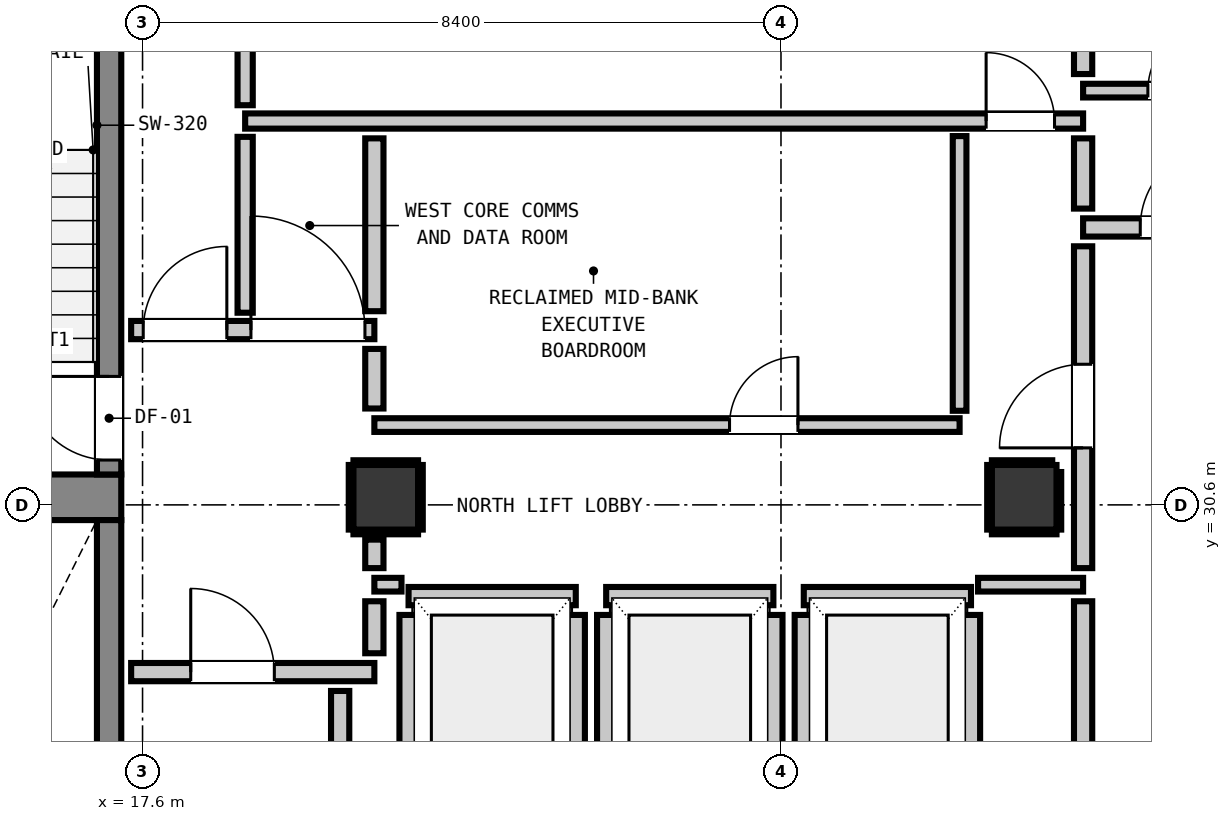
"""IFC4 building model, lengths in metres.
Left out: names, types, materials, properties, quantities, classifications, styles, units other than length and angle.
Written with IfcOpenShell. Run it as: python <this file> out.ifc"""

import sys

from ifc_helpers import new_model, si_unit, direction, frame, frame_2d, origin, origin_2d, place, context, subcontext, project, spatial, rectangle, extrude, element, fill, save


model = new_model("IFC4")
c1 = context("Model", 3, precision=1e-05, world=origin(), true_north=direction((0.0, 1.0)))
c2 = subcontext(c1, "Body", "Model", "MODEL_VIEW")
j1 = project(units=[si_unit("LENGTHUNIT", "METRE"), si_unit("PLANEANGLEUNIT", "RADIAN")], contexts=[c1])
p1 = place(None, origin())
s1 = spatial("IfcSite", under=j1, at=p1, CompositionType="ELEMENT")
p2 = place(p1, origin())
s2 = spatial("IfcBuilding", under=s1, at=p2, CompositionType="ELEMENT")
p3 = place(p2, frame((0.0, 0.0, 203.44)))
s3 = spatial("IfcBuildingStorey", under=s2, at=p3, CompositionType="ELEMENT", Elevation=203.44)
p4 = place(p3, frame((13.78, 30.7, 0.0), z_axis=(0.0, 0.0, 1.0), x_axis=(1.0, 0.0, 0.0)))
e1 = element("IfcWall", 1, at=p4, inside=s3, PredefinedType="SHEAR", context=c2, shape_type="SweptSolid", body=[
    extrude(rectangle(XDim=3.54, YDim=0.6, at=frame_2d((1.77, 0.0))), origin(), (0.0, 0.0, 1.0), 3.32),
])
p5 = place(p3, frame((17.16, 31.0, 0.0), z_axis=(0.0, 0.0, 1.0), x_axis=(0.0, 1.0, 0.0)))
e2 = element("IfcWall", 2, at=p5, inside=s3, PredefinedType="SHEAR", context=c2, shape_type="SweptSolid", body=[
    extrude(rectangle(XDim=7.8, YDim=0.32, at=frame_2d((3.9, 0.0))), origin(), (0.0, 0.0, 1.0), 3.32),
])
p6 = place(p5, frame((0.19, 0.0, 0.0)))
e3 = element("IfcOpeningElement", 3, at=p6, cuts=e2, PredefinedType="OPENING", context=c2, shape_type="SweptSolid", body=[
    extrude(rectangle(XDim=1.1, YDim=2.15, at=frame_2d((0.55, 1.075))), frame((0.0, 0.17, 0.0), z_axis=(0.0, -1.0, 0.0), x_axis=(1.0, 0.0, 0.0)), (0.0, 0.0, 1.0), 0.34),
])
p7 = place(p3, frame((17.16, 22.4, 0.0), z_axis=(0.0, 0.0, 1.0), x_axis=(0.0, 1.0, 0.0)))
e4 = element("IfcWall", 4, at=p7, inside=s3, PredefinedType="SHEAR", context=c2, shape_type="SweptSolid", body=[
    extrude(rectangle(XDim=8.0, YDim=0.32, at=frame_2d((4.0, 0.0))), origin(), (0.0, 0.0, 1.0), 3.32),
])
p8 = place(p7, frame((0.39, 0.0, 0.0)))
e5 = element("IfcOpeningElement", 5, at=p8, cuts=e4, PredefinedType="OPENING", context=c2, shape_type="SweptSolid", body=[
    extrude(rectangle(XDim=1.1, YDim=2.15, at=frame_2d((0.55, 1.075))), frame((0.0, 0.17, 0.0), z_axis=(0.0, -1.0, 0.0), x_axis=(1.0, 0.0, 0.0)), (0.0, 0.0, 1.0), 0.34),
])
for number, where, z_axis, x_axis in (
    (6, (20.8, 30.7, 0.0), (0.0, 0.0, 1.0), (1.0, 0.0, 0.0)),
    (7, (29.2, 30.7, 0.0), (0.0, 0.0, 1.0), (1.0, 0.0, 0.0)),
):
    element("IfcColumn", number, at=place(p3, frame(where, z_axis=z_axis, x_axis=x_axis)), inside=s3, PredefinedType="COLUMN", context=c2, shape_type="SweptSolid", body=[
        extrude(rectangle(XDim=0.85, YDim=0.85, at=origin_2d()), origin(), (0.0, 0.0, 1.0), 3.32),
    ])
p9 = place(p3, frame((21.1, 29.4, 0.0), z_axis=(0.0, 0.0, 1.0), x_axis=(1.0, 0.0, 0.0)))
e8 = element("IfcWall", 8, at=p9, inside=s3, PredefinedType="PARTITIONING", context=c2, shape_type="SweptSolid", body=[
    extrude(rectangle(XDim=2.2, YDim=0.24, at=frame_2d((1.1, 0.0))), origin(), (0.0, 0.0, 1.0), 3.1),
])
p10 = place(p3, frame((21.1, 27.048, 0.0), z_axis=(0.0, 0.0, 1.0), x_axis=(0.0, 1.0, 0.0)))
e9 = element("IfcWall", 9, at=p10, inside=s3, PredefinedType="PARTITIONING", context=c2, shape_type="SweptSolid", body=[
    extrude(rectangle(XDim=2.104, YDim=0.24, at=frame_2d((1.052, 0.0))), origin(), (0.0, 0.0, 1.0), 2.335),
])
p11 = place(p3, frame((23.3, 27.048, 0.0), z_axis=(0.0, 0.0, 1.0), x_axis=(0.0, 1.0, 0.0)))
e10 = element("IfcWall", 10, at=p11, inside=s3, PredefinedType="PARTITIONING", context=c2, shape_type="SweptSolid", body=[
    extrude(rectangle(XDim=2.104, YDim=0.24, at=frame_2d((1.052, 0.0))), origin(), (0.0, 0.0, 1.0), 3.1),
])
p12 = place(p3, frame((23.7, 29.4, 0.0), z_axis=(0.0, 0.0, 1.0), x_axis=(1.0, 0.0, 0.0)))
e11 = element("IfcWall", 11, at=p12, inside=s3, PredefinedType="PARTITIONING", context=c2, shape_type="SweptSolid", body=[
    extrude(rectangle(XDim=2.2, YDim=0.24, at=frame_2d((1.1, 0.0))), origin(), (0.0, 0.0, 1.0), 3.1),
])
for number, where, z_axis, x_axis in (
    (12, (23.7, 27.048, 0.0), (0.0, 0.0, 1.0), (0.0, 1.0, 0.0)),
    (13, (25.9, 27.048, 0.0), (0.0, 0.0, 1.0), (0.0, 1.0, 0.0)),
):
    element("IfcWall", number, at=place(p3, frame(where, z_axis=z_axis, x_axis=x_axis)), inside=s3, PredefinedType="PARTITIONING", context=c2, shape_type="SweptSolid", body=[
        extrude(rectangle(XDim=2.104, YDim=0.24, at=frame_2d((1.052, 0.0))), origin(), (0.0, 0.0, 1.0), 3.1),
    ])
p13 = place(p3, frame((26.3, 29.4, 0.0), z_axis=(0.0, 0.0, 1.0), x_axis=(1.0, 0.0, 0.0)))
e14 = element("IfcWall", 14, at=p13, inside=s3, PredefinedType="PARTITIONING", context=c2, shape_type="SweptSolid", body=[
    extrude(rectangle(XDim=2.2, YDim=0.24, at=frame_2d((1.1, 0.0))), origin(), (0.0, 0.0, 1.0), 3.1),
])
p14 = place(p3, frame((26.3, 27.048, 0.0), z_axis=(0.0, 0.0, 1.0), x_axis=(0.0, 1.0, 0.0)))
e15 = element("IfcWall", 15, at=p14, inside=s3, PredefinedType="PARTITIONING", context=c2, shape_type="SweptSolid", body=[
    extrude(rectangle(XDim=2.104, YDim=0.24, at=frame_2d((1.052, 0.0))), origin(), (0.0, 0.0, 1.0), 3.1),
])
p15 = place(p3, frame((28.5, 27.33, 0.0), z_axis=(0.0, 0.0, 1.0), x_axis=(0.0, 1.0, 0.0)))
e16 = element("IfcWall", 16, at=p15, inside=s3, PredefinedType="PARTITIONING", context=c2, shape_type="SweptSolid", body=[
    extrude(rectangle(XDim=1.822, YDim=0.24, at=frame_2d((0.911, 0.0))), origin(), (0.0, 0.0, 1.0), 3.1),
])
p16 = place(p3, frame((17.45, 28.4, 0.0), z_axis=(0.0, 0.0, 1.0), x_axis=(1.0, 0.0, 0.0)))
e17 = element("IfcWall", 17, at=p16, inside=s3, PredefinedType="PARTITIONING", context=c2, shape_type="SweptSolid", body=[
    extrude(rectangle(XDim=3.2, YDim=0.24, at=frame_2d((1.6, 0.0))), origin(), (0.0, 0.0, 1.0), 3.1),
])
p17 = place(p16, frame((0.784, 0.0, 0.0)))
e18 = element("IfcOpeningElement", 18, at=p17, cuts=e17, PredefinedType="OPENING", context=c2, shape_type="SweptSolid", body=[
    extrude(rectangle(XDim=1.1, YDim=2.15, at=frame_2d((0.55, 1.075))), frame((0.0, 0.13, 0.0), z_axis=(0.0, -1.0, 0.0), x_axis=(1.0, 0.0, 0.0)), (0.0, 0.0, 1.0), 0.26),
])
p18 = place(p3, frame((17.45, 32.9, 0.0), z_axis=(0.0, 0.0, 1.0), x_axis=(1.0, 0.0, 0.0)))
e19 = element("IfcWall", 19, at=p18, inside=s3, PredefinedType="PARTITIONING", context=c2, shape_type="SweptSolid", body=[
    extrude(rectangle(XDim=3.2, YDim=0.24, at=frame_2d((1.6, 0.0))), origin(), (0.0, 0.0, 1.0), 3.1),
])
p19 = place(p18, frame((0.159, 0.0, 0.0)))
e20 = element("IfcOpeningElement", 20, at=p19, cuts=e19, PredefinedType="OPENING", context=c2, shape_type="SweptSolid", body=[
    extrude(rectangle(XDim=1.1, YDim=2.15, at=frame_2d((0.55, 1.075))), frame((0.0, 0.13, 0.0), z_axis=(0.0, -1.0, 0.0), x_axis=(1.0, 0.0, 0.0)), (0.0, 0.0, 1.0), 0.26),
])
p20 = place(p18, frame((1.576, 0.0, 0.0)))
e21 = element("IfcOpeningElement", 21, at=p20, cuts=e19, PredefinedType="OPENING", context=c2, shape_type="SweptSolid", body=[
    extrude(rectangle(XDim=1.5, YDim=2.15, at=frame_2d((0.75, 1.075))), frame((0.0, 0.13, 0.0), z_axis=(0.0, -1.0, 0.0), x_axis=(1.0, 0.0, 0.0)), (0.0, 0.0, 1.0), 0.26),
])
p21 = place(p3, frame((29.975, 34.25, 0.0), z_axis=(0.0, 0.0, 1.0), x_axis=(1.0, 0.0, 0.0)))
e22 = element("IfcWall", 22, at=p21, inside=s3, PredefinedType="PARTITIONING", context=c2, shape_type="SweptSolid", body=[
    extrude(rectangle(XDim=2.475, YDim=0.24, at=frame_2d((1.237, 0.0))), origin(), (0.0, 0.0, 1.0), 3.1),
])
p22 = place(p21, frame((0.752, 0.0, 0.0)))
e23 = element("IfcOpeningElement", 23, at=p22, cuts=e22, PredefinedType="OPENING", context=c2, shape_type="SweptSolid", body=[
    extrude(rectangle(XDim=1.1, YDim=2.15, at=frame_2d((0.55, 1.075))), frame((0.0, 0.13, 0.0), z_axis=(0.0, -1.0, 0.0), x_axis=(1.0, 0.0, 0.0)), (0.0, 0.0, 1.0), 0.26),
])
p23 = place(p3, frame((18.95, 35.65, 0.0), z_axis=(0.0, 0.0, 1.0), x_axis=(1.0, 0.0, 0.0)))
e24 = element("IfcWall", 24, at=p23, inside=s3, PredefinedType="PARTITIONING", context=c2, shape_type="SweptSolid", body=[
    extrude(rectangle(XDim=11.025, YDim=0.2, at=frame_2d((5.513, 0.0))), origin(), (0.0, 0.0, 1.0), 3.1),
])
p24 = place(p23, frame((9.749, 0.0, 0.0)))
e25 = element("IfcOpeningElement", 25, at=p24, cuts=e24, PredefinedType="OPENING", context=c2, shape_type="SweptSolid", body=[
    extrude(rectangle(XDim=0.9, YDim=2.1, at=frame_2d((0.45, 1.05))), frame((0.0, 0.11, 0.0), z_axis=(0.0, -1.0, 0.0), x_axis=(1.0, 0.0, 0.0)), (0.0, 0.0, 1.0), 0.22),
])
p25 = place(p3, frame((20.65, 29.55, 0.0), z_axis=(0.0, 0.0, 1.0), x_axis=(1.0, 0.0, 0.0)))
e26 = element("IfcWall", 26, at=p25, inside=s3, PredefinedType="PARTITIONING", context=c2, shape_type="SweptSolid", body=[
    extrude(rectangle(XDim=0.357, YDim=0.18, at=frame_2d((0.179, 0.0))), origin(), (0.0, 0.0, 1.0), 3.1),
])
p26 = place(p3, frame((28.593, 29.55, 0.0), z_axis=(0.0, 0.0, 1.0), x_axis=(1.0, 0.0, 0.0)))
e27 = element("IfcWall", 27, at=p26, inside=s3, PredefinedType="PARTITIONING", context=c2, shape_type="SweptSolid", body=[
    extrude(rectangle(XDim=1.382, YDim=0.18, at=frame_2d((0.691, 0.0))), origin(), (0.0, 0.0, 1.0), 3.1),
])
p27 = place(p3, frame((20.65, 31.65, 0.0), z_axis=(0.0, 0.0, 1.0), x_axis=(1.0, 0.0, 0.0)))
e28 = element("IfcWall", 28, at=p27, inside=s3, PredefinedType="PARTITIONING", context=c2, shape_type="SweptSolid", body=[
    extrude(rectangle(XDim=7.7, YDim=0.18, at=frame_2d((3.85, 0.0))), origin(), (0.0, 0.0, 1.0), 3.1),
])
p28 = place(p27, frame((4.673, 0.0, 0.0)))
e29 = element("IfcOpeningElement", 29, at=p28, cuts=e28, PredefinedType="OPENING", context=c2, shape_type="SweptSolid", body=[
    extrude(rectangle(XDim=0.9, YDim=2.1, at=frame_2d((0.45, 1.05))), frame((0.0, 0.1, 0.0), z_axis=(0.0, -1.0, 0.0), x_axis=(1.0, 0.0, 0.0)), (0.0, 0.0, 1.0), 0.2),
])
p29 = place(p3, frame((29.975, 36.05, 0.0), z_axis=(0.0, 0.0, 1.0), x_axis=(1.0, 0.0, 0.0)))
e30 = element("IfcWall", 30, at=p29, inside=s3, PredefinedType="PARTITIONING", context=c2, shape_type="SweptSolid", body=[
    extrude(rectangle(XDim=2.505, YDim=0.18, at=frame_2d((1.252, 0.0))), origin(), (0.0, 0.0, 1.0), 3.1),
])
p30 = place(p29, frame((0.852, 0.0, 0.0)))
e31 = element("IfcOpeningElement", 31, at=p30, cuts=e30, PredefinedType="OPENING", context=c2, shape_type="SweptSolid", body=[
    extrude(rectangle(XDim=0.9, YDim=2.1, at=frame_2d((0.45, 1.05))), frame((0.0, 0.1, 0.0), z_axis=(0.0, -1.0, 0.0), x_axis=(1.0, 0.0, 0.0)), (0.0, 0.0, 1.0), 0.2),
])
p31 = place(p3, frame((20.2, 21.398, 0.0), z_axis=(0.0, 0.0, 1.0), x_axis=(0.0, 1.0, 0.0)))
e32 = element("IfcWall", 32, at=p31, inside=s3, PredefinedType="PARTITIONING", context=c2, shape_type="SweptSolid", body=[
    extrude(rectangle(XDim=6.754, YDim=0.24, at=frame_2d((3.377, 0.0))), origin(), (0.0, 0.0, 1.0), 3.1),
])
p32 = place(p3, frame((20.65, 28.648, 0.0), z_axis=(0.0, 0.0, 1.0), x_axis=(0.0, 1.0, 0.0)))
e33 = element("IfcWall", 33, at=p32, inside=s3, PredefinedType="PARTITIONING", context=c2, shape_type="SweptSolid", body=[
    extrude(rectangle(XDim=0.684, YDim=0.24, at=frame_2d((0.342, 0.0))), origin(), (0.0, 0.0, 1.0), 2.335),
])
p33 = place(p3, frame((20.65, 29.768, 0.0), z_axis=(0.0, 0.0, 1.0), x_axis=(0.0, 1.0, 0.0)))
e34 = element("IfcWall", 34, at=p33, inside=s3, PredefinedType="PARTITIONING", context=c2, shape_type="SweptSolid", body=[
    extrude(rectangle(XDim=0.375, YDim=0.24, at=frame_2d((0.188, 0.0))), origin(), (0.0, 0.0, 1.0), 2.335),
])
p34 = place(p3, frame((20.65, 31.868, 0.0), z_axis=(0.0, 0.0, 1.0), x_axis=(0.0, 1.0, 0.0)))
e35 = element("IfcWall", 35, at=p34, inside=s3, PredefinedType="PARTITIONING", context=c2, shape_type="SweptSolid", body=[
    extrude(rectangle(XDim=0.784, YDim=0.24, at=frame_2d((0.392, 0.0))), origin(), (0.0, 0.0, 1.0), 2.335),
])
p35 = place(p3, frame((20.65, 33.148, 0.0), z_axis=(0.0, 0.0, 1.0), x_axis=(0.0, 1.0, 0.0)))
e36 = element("IfcWall", 36, at=p35, inside=s3, PredefinedType="PARTITIONING", context=c2, shape_type="SweptSolid", body=[
    extrude(rectangle(XDim=2.274, YDim=0.24, at=frame_2d((1.137, 0.0))), origin(), (0.0, 0.0, 1.0), 2.335),
])
p36 = place(p3, frame((29.975, 25.648, 0.0), z_axis=(0.0, 0.0, 1.0), x_axis=(0.0, 1.0, 0.0)))
e37 = element("IfcWall", 37, at=p36, inside=s3, PredefinedType="PARTITIONING", context=c2, shape_type="SweptSolid", body=[
    extrude(rectangle(XDim=3.684, YDim=0.24, at=frame_2d((1.842, 0.0))), origin(), (0.0, 0.0, 1.0), 3.1),
])
p37 = place(p3, frame((29.975, 29.768, 0.0), z_axis=(0.0, 0.0, 1.0), x_axis=(0.0, 1.0, 0.0)))
e38 = element("IfcWall", 38, at=p37, inside=s3, PredefinedType="PARTITIONING", context=c2, shape_type="SweptSolid", body=[
    extrude(rectangle(XDim=4.234, YDim=0.24, at=frame_2d((2.117, 0.0))), origin(), (0.0, 0.0, 1.0), 3.1),
])
p38 = place(p37, frame((1.582, 0.0, 0.0)))
e39 = element("IfcOpeningElement", 39, at=p38, cuts=e38, PredefinedType="OPENING", context=c2, shape_type="SweptSolid", body=[
    extrude(rectangle(XDim=1.1, YDim=2.15, at=frame_2d((0.55, 1.075))), frame((0.0, 0.13, 0.0), z_axis=(0.0, -1.0, 0.0), x_axis=(1.0, 0.0, 0.0)), (0.0, 0.0, 1.0), 0.26),
])
p39 = place(p3, frame((29.975, 34.498, 0.0), z_axis=(0.0, 0.0, 1.0), x_axis=(0.0, 1.0, 0.0)))
e40 = element("IfcWall", 40, at=p39, inside=s3, PredefinedType="PARTITIONING", context=c2, shape_type="SweptSolid", body=[
    extrude(rectangle(XDim=0.924, YDim=0.24, at=frame_2d((0.462, 0.0))), origin(), (0.0, 0.0, 1.0), 3.1),
])
p40 = place(p3, frame((29.975, 36.268, 0.0), z_axis=(0.0, 0.0, 1.0), x_axis=(0.0, 1.0, 0.0)))
e41 = element("IfcWall", 41, at=p40, inside=s3, PredefinedType="PARTITIONING", context=c2, shape_type="SweptSolid", body=[
    extrude(rectangle(XDim=2.294, YDim=0.24, at=frame_2d((1.147, 0.0))), origin(), (0.0, 0.0, 1.0), 3.1),
])
p41 = place(p3, frame((18.95, 33.128, 0.0), z_axis=(0.0, 0.0, 1.0), x_axis=(0.0, 1.0, 0.0)))
e42 = element("IfcWall", 42, at=p41, inside=s3, PredefinedType="PARTITIONING", context=c2, shape_type="SweptSolid", body=[
    extrude(rectangle(XDim=2.314, YDim=0.2, at=frame_2d((1.157, 0.0))), origin(), (0.0, 0.0, 1.0), 3.1),
])
p42 = place(p3, frame((18.95, 35.858, 0.0), z_axis=(0.0, 0.0, 1.0), x_axis=(0.0, 1.0, 0.0)))
e43 = element("IfcWall", 43, at=p42, inside=s3, PredefinedType="PARTITIONING", context=c2, shape_type="SweptSolid", body=[
    extrude(rectangle(XDim=2.724, YDim=0.2, at=frame_2d((1.362, 0.0))), origin(), (0.0, 0.0, 1.0), 3.1),
])
p43 = place(p3, frame((28.35, 31.838, 0.0), z_axis=(0.0, 0.0, 1.0), x_axis=(0.0, 1.0, 0.0)))
e44 = element("IfcWall", 44, at=p43, inside=s3, PredefinedType="PARTITIONING", context=c2, shape_type="SweptSolid", body=[
    extrude(rectangle(XDim=3.614, YDim=0.18, at=frame_2d((1.807, 0.0))), origin(), (0.0, 0.0, 1.0), 3.1),
])
for number, where, z_axis, x_axis in (
    (45, (20.375, 30.243, 0.0), (0.0, 0.0, 1.0), (1.0, 0.0, 0.0)),
    (46, (20.375, 31.157, 0.0), (0.0, 0.0, 1.0), (1.0, 0.0, 0.0)),
    (47, (20.343, 30.275, 0.0), (0.0, 0.0, 1.0), (0.0, 1.0, 0.0)),
    (48, (21.257, 30.275, 0.0), (0.0, 0.0, 1.0), (0.0, 1.0, 0.0)),
    (49, (28.775, 30.243, 0.0), (0.0, 0.0, 1.0), (1.0, 0.0, 0.0)),
):
    element("IfcWall", number, at=place(p3, frame(where, z_axis=z_axis, x_axis=x_axis)), inside=s3, PredefinedType="PARTITIONING", context=c2, shape_type="SweptSolid", body=[
        extrude(rectangle(XDim=0.85, YDim=0.06, at=frame_2d((0.425, 0.0))), origin(), (0.0, 0.0, 1.0), 1.45),
    ])
p44 = place(p3, frame((28.775, 31.157, 0.0), z_axis=(0.0, 0.0, 1.0), x_axis=(1.0, 0.0, 0.0)))
e50 = element("IfcWall", 50, at=p44, inside=s3, PredefinedType="PARTITIONING", context=c2, shape_type="SweptSolid", body=[
    extrude(rectangle(XDim=0.794, YDim=0.06, at=frame_2d((0.397, 0.0))), origin(), (0.0, 0.0, 1.0), 1.45),
])
p45 = place(p3, frame((28.743, 30.275, 0.0), z_axis=(0.0, 0.0, 1.0), x_axis=(0.0, 1.0, 0.0)))
e51 = element("IfcWall", 51, at=p45, inside=s3, PredefinedType="PARTITIONING", context=c2, shape_type="SweptSolid", body=[
    extrude(rectangle(XDim=0.85, YDim=0.06, at=frame_2d((0.425, 0.0))), origin(), (0.0, 0.0, 1.0), 1.45),
])
p46 = place(p3, frame((29.657, 30.275, 0.0), z_axis=(0.0, 0.0, 1.0), x_axis=(0.0, 1.0, 0.0)))
e52 = element("IfcWall", 52, at=p46, inside=s3, PredefinedType="PARTITIONING", context=c2, shape_type="SweptSolid", body=[
    extrude(rectangle(XDim=0.757, YDim=0.06, at=frame_2d((0.378, 0.0))), origin(), (0.0, 0.0, 1.0), 1.45),
])
p47 = place(p6, origin())
e53 = element("IfcDoor", 53, at=p47, inside=s3, OperationType="SINGLE_SWING_RIGHT", PredefinedType="DOOR", context=c2, shape_type="SweptSolid", body=[
    extrude(rectangle(XDim=1.1, YDim=2.15, at=frame_2d((0.55, 1.075))), frame((0.0, 0.025, 0.0), z_axis=(0.0, -1.0, 0.0), x_axis=(1.0, 0.0, 0.0)), (0.0, 0.0, 1.0), 0.05),
])
fill(e3, e53)
p48 = place(p17, origin())
e54 = element("IfcDoor", 54, at=p48, inside=s3, OperationType="SINGLE_SWING_LEFT", PredefinedType="DOOR", context=c2, shape_type="SweptSolid", body=[
    extrude(rectangle(XDim=1.1, YDim=2.15, at=frame_2d((0.55, 1.075))), frame((0.0, 0.025, 0.0), z_axis=(0.0, -1.0, 0.0), x_axis=(1.0, 0.0, 0.0)), (0.0, 0.0, 1.0), 0.05),
])
fill(e18, e54)
p49 = place(p19, origin())
e55 = element("IfcDoor", 55, at=p49, inside=s3, OperationType="SINGLE_SWING_RIGHT", PredefinedType="DOOR", context=c2, shape_type="SweptSolid", body=[
    extrude(rectangle(XDim=1.1, YDim=2.15, at=frame_2d((0.55, 1.075))), frame((0.0, 0.025, 0.0), z_axis=(0.0, -1.0, 0.0), x_axis=(1.0, 0.0, 0.0)), (0.0, 0.0, 1.0), 0.05),
])
fill(e20, e55)
p50 = place(p38, origin())
e56 = element("IfcDoor", 56, at=p50, inside=s3, OperationType="SINGLE_SWING_LEFT", PredefinedType="DOOR", context=c2, shape_type="SweptSolid", body=[
    extrude(rectangle(XDim=1.1, YDim=2.15, at=frame_2d((0.55, 1.075))), frame((0.0, 0.025, 0.0), z_axis=(0.0, -1.0, 0.0), x_axis=(1.0, 0.0, 0.0)), (0.0, 0.0, 1.0), 0.05),
])
fill(e39, e56)
p51 = place(p22, origin())
e57 = element("IfcDoor", 57, at=p51, inside=s3, OperationType="SINGLE_SWING_RIGHT", PredefinedType="DOOR", context=c2, shape_type="SweptSolid", body=[
    extrude(rectangle(XDim=1.1, YDim=2.15, at=frame_2d((0.55, 1.075))), frame((0.0, 0.025, 0.0), z_axis=(0.0, -1.0, 0.0), x_axis=(1.0, 0.0, 0.0)), (0.0, 0.0, 1.0), 0.05),
])
fill(e23, e57)
p52 = place(p20, origin())
e58 = element("IfcDoor", 58, at=p52, inside=s3, OperationType="SINGLE_SWING_LEFT", PredefinedType="DOOR", context=c2, shape_type="SweptSolid", body=[
    extrude(rectangle(XDim=1.5, YDim=2.15, at=frame_2d((0.75, 1.075))), frame((0.0, 0.025, 0.0), z_axis=(0.0, -1.0, 0.0), x_axis=(1.0, 0.0, 0.0)), (0.0, 0.0, 1.0), 0.05),
])
fill(e21, e58)
p53 = place(p30, origin())
e59 = element("IfcDoor", 59, at=p53, inside=s3, OperationType="SINGLE_SWING_RIGHT", PredefinedType="DOOR", context=c2, shape_type="SweptSolid", body=[
    extrude(rectangle(XDim=0.9, YDim=2.1, at=frame_2d((0.45, 1.05))), frame((0.0, 0.025, 0.0), z_axis=(0.0, -1.0, 0.0), x_axis=(1.0, 0.0, 0.0)), (0.0, 0.0, 1.0), 0.05),
])
fill(e31, e59)
p54 = place(p24, origin())
e60 = element("IfcDoor", 60, at=p54, inside=s3, OperationType="SINGLE_SWING_LEFT", PredefinedType="DOOR", context=c2, shape_type="SweptSolid", body=[
    extrude(rectangle(XDim=0.9, YDim=2.1, at=frame_2d((0.45, 1.05))), frame((0.0, 0.025, 0.0), z_axis=(0.0, -1.0, 0.0), x_axis=(1.0, 0.0, 0.0)), (0.0, 0.0, 1.0), 0.05),
])
fill(e25, e60)
p55 = place(p28, origin())
e61 = element("IfcDoor", 61, at=p55, inside=s3, OperationType="SINGLE_SWING_RIGHT", PredefinedType="DOOR", context=c2, shape_type="SweptSolid", body=[
    extrude(rectangle(XDim=0.9, YDim=2.1, at=frame_2d((0.45, 1.05))), frame((0.0, 0.025, 0.0), z_axis=(0.0, -1.0, 0.0), x_axis=(1.0, 0.0, 0.0)), (0.0, 0.0, 1.0), 0.05),
])
fill(e29, e61)
save(model, sys.argv[1])
